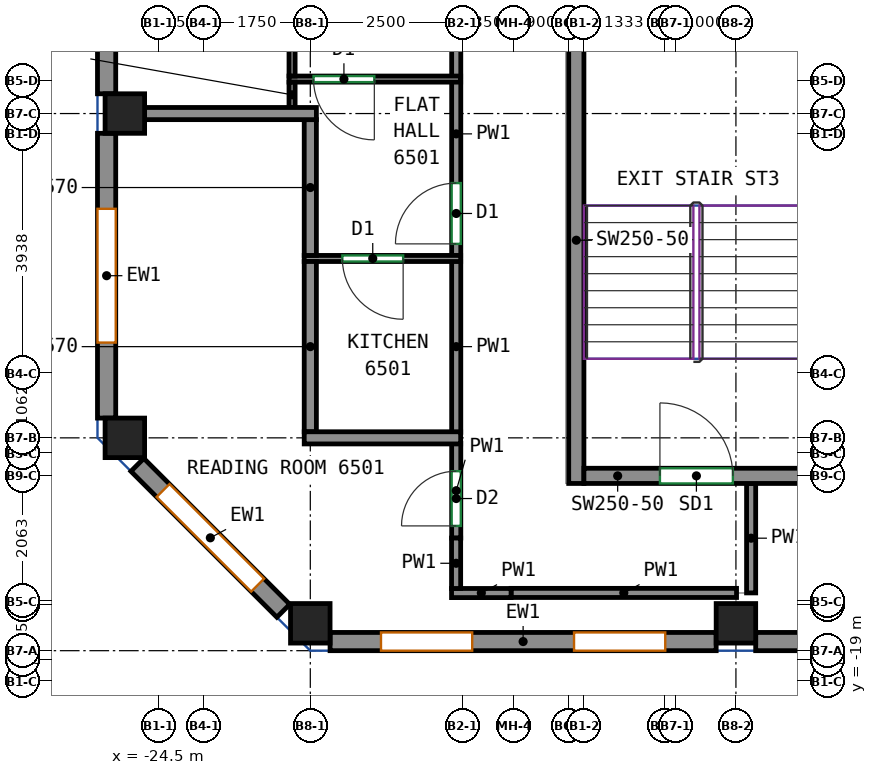
"""IFC4 building model, lengths in metres.
Left out: names, types, materials, properties, quantities, classifications, styles, units other than length and angle.
Written with IfcOpenShell. Run it as: python <this file> out.ifc"""

import sys

from ifc_helpers import new_model, si_unit, direction, frame, frame_2d, origin, origin_2d, place, context, subcontext, project, spatial, rectangle, extrude, source, transform, mapped, element, fill, save


model = new_model("IFC4")
c1 = context("Model", 3, precision=1e-05, world=origin(), true_north=direction((0.0, 1.0)))
c2 = subcontext(c1, "Body", "Model", "MODEL_VIEW")
j1 = project(units=[si_unit("LENGTHUNIT", "METRE"), si_unit("PLANEANGLEUNIT", "RADIAN")], contexts=[c1])
p1 = place(None, origin())
s1 = spatial("IfcSite", under=j1, at=p1, CompositionType="ELEMENT")
p2 = place(p1, origin())
s2 = spatial("IfcBuilding", under=s1, at=p2, CompositionType="ELEMENT")
p3 = place(p2, frame((0.0, 0.0, 267.0)))
s3 = spatial("IfcBuildingStorey", under=s2, at=p3, CompositionType="ELEMENT", Elevation=267.0)
m1 = source(origin(), c2, "Body", "SweptSolid", [
    extrude(rectangle(XDim=0.65, YDim=0.65, at=origin_2d()), origin(), (0.0, 0.0, 1.0), 3.12),
])
for number, where, z_axis, x_axis in (
    (1, (-25.05, -15.0, 0.0), (0.0, 0.0, 1.0), (1.0, 0.0, 0.0)),
    (2, (-25.05, -9.667, 0.0), (0.0, 0.0, 1.0), (1.0, 0.0, 0.0)),
    (3, (-22.0, -18.05, 0.0), (0.0, 0.0, 1.0), (1.0, 0.0, 0.0)),
    (4, (-15.0, -18.05, 0.0), (0.0, 0.0, 1.0), (1.0, 0.0, 0.0)),
):
    element("IfcColumn", number, at=place(p3, frame(where, z_axis=z_axis, x_axis=x_axis)), inside=s3, PredefinedType="COLUMN", context=c2, shape_type="MappedRepresentation", body=[
        mapped(m1, transform((0.0, 0.0, 0.0))),
    ])
m2 = source(origin(), c2, "Body", "SweptSolid", [
    extrude(rectangle(XDim=8.0, YDim=0.25, at=frame_2d((4.0, 0.0))), origin(), (0.0, 0.0, 1.0), 3.12),
])
p4 = place(p3, frame((-17.625, -15.75, 0.0), z_axis=(0.0, 0.0, 1.0), x_axis=(0.0, 1.0, 0.0)))
e5 = element("IfcWall", 5, at=p4, inside=s3, PredefinedType="SHEAR", context=c2, shape_type="MappedRepresentation", body=[
    mapped(m2, transform((0.0, 0.0, 0.0))),
])
m3 = source(origin(), c2, "Body", "SweptSolid", [
    extrude(rectangle(XDim=3.7, YDim=0.25, at=frame_2d((1.85, 0.0))), origin(), (0.0, 0.0, 1.0), 3.12),
])
p5 = place(p3, frame((-17.5, -15.625, 0.0), z_axis=(0.0, 0.0, 1.0), x_axis=(1.0, 0.0, 0.0)))
e6 = element("IfcWall", 6, at=p5, inside=s3, PredefinedType="SHEAR", context=c2, shape_type="MappedRepresentation", body=[
    mapped(m3, transform((0.0, 0.0, 0.0))),
])
p6 = place(p5, frame((1.25, 0.0, 0.0)))
e7 = element("IfcOpeningElement", 7, at=p6, cuts=e6, PredefinedType="OPENING", context=c2, shape_type="SweptSolid", body=[
    extrude(rectangle(XDim=1.2, YDim=2.1, at=frame_2d((0.6, 1.05))), frame((0.0, 0.135, 0.0), z_axis=(0.0, -1.0, 0.0), x_axis=(1.0, 0.0, 0.0)), (0.0, 0.0, 1.0), 0.27),
])
m4 = source(origin(), c2, "Body", "SweptSolid", [
    extrude(rectangle(XDim=6.35, YDim=0.3, at=frame_2d((3.175, 0.0))), origin(), (0.0, 0.0, 1.0), 3.12),
])
p7 = place(p3, frame((-21.675, -18.35, 0.0), z_axis=(0.0, 0.0, 1.0), x_axis=(1.0, 0.0, 0.0)))
e8 = element("IfcWall", 8, at=p7, inside=s3, PredefinedType="SOLIDWALL", context=c2, shape_type="MappedRepresentation", body=[
    mapped(m4, transform((0.0, 0.0, 0.0))),
])
p8 = place(p7, frame((0.837, 0.0, 0.8)))
e9 = element("IfcOpeningElement", 9, at=p8, cuts=e8, PredefinedType="OPENING", context=c2, shape_type="SweptSolid", body=[
    extrude(rectangle(XDim=1.5, YDim=2.05, at=frame_2d((0.75, 1.025))), frame((0.0, 0.16, 0.0), z_axis=(0.0, -1.0, 0.0), x_axis=(1.0, 0.0, 0.0)), (0.0, 0.0, 1.0), 0.32),
])
p9 = place(p7, frame((4.012, 0.0, 0.8)))
e10 = element("IfcOpeningElement", 10, at=p9, cuts=e8, PredefinedType="OPENING", context=c2, shape_type="SweptSolid", body=[
    extrude(rectangle(XDim=1.5, YDim=2.05, at=frame_2d((0.75, 1.025))), frame((0.0, 0.16, 0.0), z_axis=(0.0, -1.0, 0.0), x_axis=(1.0, 0.0, 0.0)), (0.0, 0.0, 1.0), 0.32),
])
p10 = place(p3, frame((-14.675, -18.35, 0.0), z_axis=(0.0, 0.0, 1.0), x_axis=(1.0, 0.0, 0.0)))
e11 = element("IfcWall", 11, at=p10, inside=s3, PredefinedType="SOLIDWALL", context=c2, shape_type="MappedRepresentation", body=[
    mapped(m4, transform((0.0, 0.0, 0.0))),
])
p11 = place(p10, frame((0.837, 0.0, 0.8)))
e12 = element("IfcOpeningElement", 12, at=p11, cuts=e11, PredefinedType="OPENING", context=c2, shape_type="SweptSolid", body=[
    extrude(rectangle(XDim=1.5, YDim=2.05, at=frame_2d((0.75, 1.025))), frame((0.0, 0.16, 0.0), z_axis=(0.0, -1.0, 0.0), x_axis=(1.0, 0.0, 0.0)), (0.0, 0.0, 1.0), 0.32),
])
p12 = place(p10, frame((4.012, 0.0, 0.8)))
e13 = element("IfcOpeningElement", 13, at=p12, cuts=e11, PredefinedType="OPENING", context=c2, shape_type="SweptSolid", body=[
    extrude(rectangle(XDim=1.5, YDim=2.05, at=frame_2d((0.75, 1.025))), frame((0.0, 0.16, 0.0), z_axis=(0.0, -1.0, 0.0), x_axis=(1.0, 0.0, 0.0)), (0.0, 0.0, 1.0), 0.32),
])
m5 = source(origin(), c2, "Body", "SweptSolid", [
    extrude(rectangle(XDim=8.184, YDim=0.3, at=frame_2d((4.092, 0.0))), origin(), (0.0, 0.0, 1.0), 3.12),
])
p13 = place(p3, frame((-25.35, -1.158, 0.0), z_axis=(0.0, 0.0, 1.0), x_axis=(0.0, -1.0, 0.0)))
e14 = element("IfcWall", 14, at=p13, inside=s3, PredefinedType="SOLIDWALL", context=c2, shape_type="MappedRepresentation", body=[
    mapped(m5, transform((0.0, 0.0, 0.0))),
])
p14 = place(p13, frame((0.946, 0.0, 0.8)))
e15 = element("IfcOpeningElement", 15, at=p14, cuts=e14, PredefinedType="OPENING", context=c2, shape_type="SweptSolid", body=[
    extrude(rectangle(XDim=2.2, YDim=2.05, at=frame_2d((1.1, 1.025))), frame((0.0, 0.16, 0.0), z_axis=(0.0, -1.0, 0.0), x_axis=(1.0, 0.0, 0.0)), (0.0, 0.0, 1.0), 0.32),
])
p15 = place(p13, frame((5.038, 0.0, 0.8)))
e16 = element("IfcOpeningElement", 16, at=p15, cuts=e14, PredefinedType="OPENING", context=c2, shape_type="SweptSolid", body=[
    extrude(rectangle(XDim=2.2, YDim=2.05, at=frame_2d((1.1, 1.025))), frame((0.0, 0.16, 0.0), z_axis=(0.0, -1.0, 0.0), x_axis=(1.0, 0.0, 0.0)), (0.0, 0.0, 1.0), 0.32),
])
m6 = source(origin(), c2, "Body", "SweptSolid", [
    extrude(rectangle(XDim=4.683, YDim=0.3, at=frame_2d((2.342, 0.0))), origin(), (0.0, 0.0, 1.0), 3.12),
])
p16 = place(p3, frame((-25.35, -9.992, 0.0), z_axis=(0.0, 0.0, 1.0), x_axis=(0.0, -1.0, 0.0)))
e17 = element("IfcWall", 17, at=p16, inside=s3, PredefinedType="SOLIDWALL", context=c2, shape_type="MappedRepresentation", body=[
    mapped(m6, transform((0.0, 0.0, 0.0))),
])
p17 = place(p16, frame((1.242, 0.0, 0.8)))
e18 = element("IfcOpeningElement", 18, at=p17, cuts=e17, PredefinedType="OPENING", context=c2, shape_type="SweptSolid", body=[
    extrude(rectangle(XDim=2.2, YDim=2.05, at=frame_2d((1.1, 1.025))), frame((0.0, 0.16, 0.0), z_axis=(0.0, -1.0, 0.0), x_axis=(1.0, 0.0, 0.0)), (0.0, 0.0, 1.0), 0.32),
])
m7 = source(origin(), c2, "Body", "SweptSolid", [
    extrude(rectangle(XDim=3.394, YDim=0.3, at=frame_2d((1.697, 0.0))), origin(), (0.0, 0.0, 1.0), 3.12),
])
p18 = place(p3, frame((-24.844, -15.444, 0.0), z_axis=(0.0, 0.0, 1.0), x_axis=(0.707070815327, -0.707142745217, 0.0)))
e19 = element("IfcWall", 19, at=p18, inside=s3, PredefinedType="SOLIDWALL", context=c2, shape_type="MappedRepresentation", body=[
    mapped(m7, transform((0.0, 0.0, 0.0))),
])
p19 = place(p18, frame((0.597, 0.0, 0.8)))
e20 = element("IfcOpeningElement", 20, at=p19, cuts=e19, PredefinedType="OPENING", context=c2, shape_type="SweptSolid", body=[
    extrude(rectangle(XDim=2.2, YDim=2.05, at=frame_2d((1.1, 1.025))), frame((0.0, 0.16, 0.0), z_axis=(0.0, -1.0, 0.0), x_axis=(1.0, 0.0, 0.0)), (0.0, 0.0, 1.0), 0.32),
])
p20 = place(p3, frame((-19.6, -14.91, 0.0), z_axis=(0.0, 0.0, 1.0), x_axis=(0.0, 1.0, 0.0)))
e21 = element("IfcWall", 21, at=p20, inside=s3, PredefinedType="PARTITIONING", context=c2, shape_type="SweptSolid", body=[
    extrude(rectangle(XDim=2.82, YDim=0.15, at=frame_2d((1.41, 0.0))), origin(), (0.0, 0.0, 1.0), 3.12),
])
p21 = place(p3, frame((-19.6, -12.01, 0.0), z_axis=(0.0, 0.0, 1.0), x_axis=(0.0, 1.0, 0.0)))
e22 = element("IfcWall", 22, at=p21, inside=s3, PredefinedType="PARTITIONING", context=c2, shape_type="SweptSolid", body=[
    extrude(rectangle(XDim=2.87, YDim=0.15, at=frame_2d((1.435, 0.0))), origin(), (0.0, 0.0, 1.0), 3.12),
])
p22 = place(p21, frame((0.2, 0.0, 0.0)))
e23 = element("IfcOpeningElement", 23, at=p22, cuts=e22, PredefinedType="OPENING", context=c2, shape_type="SweptSolid", body=[
    extrude(rectangle(XDim=1.0, YDim=2.1, at=frame_2d((0.5, 1.05))), frame((0.0, 0.085, 0.0), z_axis=(0.0, -1.0, 0.0), x_axis=(1.0, 0.0, 0.0)), (0.0, 0.0, 1.0), 0.17),
])
p23 = place(p3, frame((-19.6, -9.06, 0.0), z_axis=(0.0, 0.0, 1.0), x_axis=(0.0, 1.0, 0.0)))
e24 = element("IfcWall", 24, at=p23, inside=s3, PredefinedType="PARTITIONING", context=c2, shape_type="SweptSolid", body=[
    extrude(rectangle(XDim=1.608, YDim=0.15, at=frame_2d((0.804, 0.0))), origin(), (0.0, 0.0, 1.0), 3.12),
])
p24 = place(p3, frame((-14.75, -17.55, 0.0), z_axis=(0.0, 0.0, 1.0), x_axis=(0.0, 1.0, 0.0)))
e25 = element("IfcWall", 25, at=p24, inside=s3, PredefinedType="PARTITIONING", context=c2, shape_type="SweptSolid", body=[
    extrude(rectangle(XDim=1.8, YDim=0.15, at=frame_2d((0.9, 0.0))), origin(), (0.0, 0.0, 1.0), 3.12),
])
p25 = place(p3, frame((-19.6, -16.648, 0.0), z_axis=(0.0, 0.0, 1.0), x_axis=(0.0, 1.0, 0.0)))
e26 = element("IfcWall", 26, at=p25, inside=s3, PredefinedType="PARTITIONING", context=c2, shape_type="SweptSolid", body=[
    extrude(rectangle(XDim=1.558, YDim=0.15, at=frame_2d((0.779, 0.0))), origin(), (0.0, 0.0, 1.0), 3.12),
])
p26 = place(p25, frame((0.2, 0.0, 0.0)))
e27 = element("IfcOpeningElement", 27, at=p26, cuts=e26, PredefinedType="OPENING", context=c2, shape_type="SweptSolid", body=[
    extrude(rectangle(XDim=0.9, YDim=2.1, at=frame_2d((0.45, 1.05))), frame((0.0, 0.085, 0.0), z_axis=(0.0, -1.0, 0.0), x_axis=(1.0, 0.0, 0.0)), (0.0, 0.0, 1.0), 0.17),
])
p27 = place(p3, frame((-18.698, -17.55, 0.0), z_axis=(0.0, 0.0, 1.0), x_axis=(1.0, 0.0, 0.0)))
e28 = element("IfcWall", 28, at=p27, inside=s3, PredefinedType="PARTITIONING", context=c2, shape_type="SweptSolid", body=[
    extrude(rectangle(XDim=3.708, YDim=0.15, at=frame_2d((1.854, 0.0))), origin(), (0.0, 0.0, 1.0), 3.12),
])
p28 = place(p3, frame((-19.677, -17.552, 0.0), z_axis=(0.0, 0.0, 1.0), x_axis=(1.0, 0.0, 0.0)))
e29 = element("IfcWall", 29, at=p28, inside=s3, PredefinedType="PARTITIONING", context=c2, shape_type="SweptSolid", body=[
    extrude(rectangle(XDim=0.979, YDim=0.15, at=frame_2d((0.49, 0.0))), origin(), (0.0, 0.0, 1.0), 3.12),
])
p29 = place(p3, frame((-19.602, -17.477, 0.0), z_axis=(0.0, 0.0, 1.0), x_axis=(0.0, 1.0, 0.0)))
e30 = element("IfcWall", 30, at=p29, inside=s3, PredefinedType="PARTITIONING", context=c2, shape_type="SweptSolid", body=[
    extrude(rectangle(XDim=0.829, YDim=0.15, at=frame_2d((0.415, 0.0))), origin(), (0.0, 0.0, 1.0), 3.12),
])
p30 = place(p3, frame((-19.527, -12.05, 0.0), z_axis=(0.0, 0.0, 1.0), x_axis=(-1.0, 0.0, 0.0)))
e31 = element("IfcWall", 31, at=p30, inside=s3, PredefinedType="PARTITIONING", context=c2, shape_type="SweptSolid", body=[
    extrude(rectangle(XDim=2.573, YDim=0.1, at=frame_2d((1.287, 0.0))), origin(), (0.0, 0.0, 1.0), 3.12),
])
p31 = place(p30, frame((0.946, 0.0, 0.0)))
e32 = element("IfcOpeningElement", 32, at=p31, cuts=e31, PredefinedType="OPENING", context=c2, shape_type="SweptSolid", body=[
    extrude(rectangle(XDim=1.0, YDim=2.1, at=frame_2d((0.5, 1.05))), frame((0.0, 0.06, 0.0), z_axis=(0.0, -1.0, 0.0), x_axis=(1.0, 0.0, 0.0)), (0.0, 0.0, 1.0), 0.12),
])
p32 = place(p3, frame((-22.0, -14.9, 0.0), z_axis=(0.0, 0.0, 1.0), x_axis=(0.0, 1.0, 0.0)))
e33 = element("IfcWall", 33, at=p32, inside=s3, PredefinedType="PARTITIONING", context=c2, shape_type="SweptSolid", body=[
    extrude(rectangle(XDim=2.8, YDim=0.2, at=frame_2d((1.4, 0.0))), origin(), (0.0, 0.0, 1.0), 2.57),
])
p33 = place(p3, frame((-22.1, -15.0, 0.0), z_axis=(0.0, 0.0, 1.0), x_axis=(1.0, 0.0, 0.0)))
e34 = element("IfcWall", 34, at=p33, inside=s3, PredefinedType="PARTITIONING", context=c2, shape_type="SweptSolid", body=[
    extrude(rectangle(XDim=2.573, YDim=0.2, at=frame_2d((1.287, 0.0))), origin(), (0.0, 0.0, 1.0), 3.12),
])
p34 = place(p3, frame((-19.527, -9.1, 0.0), z_axis=(0.0, 0.0, 1.0), x_axis=(-1.0, 0.0, 0.0)))
e35 = element("IfcWall", 35, at=p34, inside=s3, PredefinedType="PARTITIONING", context=c2, shape_type="SweptSolid", body=[
    extrude(rectangle(XDim=2.823, YDim=0.1, at=frame_2d((1.412, 0.0))), origin(), (0.0, 0.0, 1.0), 3.12),
])
p35 = place(p34, frame((1.42, 0.0, 0.0)))
e36 = element("IfcOpeningElement", 36, at=p35, cuts=e35, PredefinedType="OPENING", context=c2, shape_type="SweptSolid", body=[
    extrude(rectangle(XDim=1.0, YDim=2.1, at=frame_2d((0.5, 1.05))), frame((0.0, 0.06, 0.0), z_axis=(0.0, -1.0, 0.0), x_axis=(1.0, 0.0, 0.0)), (0.0, 0.0, 1.0), 0.12),
])
p36 = place(p3, frame((-22.3, -9.567, 0.0), z_axis=(0.0, 0.0, 1.0), x_axis=(0.0, 1.0, 0.0)))
e37 = element("IfcWall", 37, at=p36, inside=s3, PredefinedType="PARTITIONING", context=c2, shape_type="SweptSolid", body=[
    extrude(rectangle(XDim=0.417, YDim=0.1, at=frame_2d((0.208, 0.0))), origin(), (0.0, 0.0, 1.0), 2.57),
])
p37 = place(p3, frame((-22.0, -12.0, 0.0), z_axis=(0.0, 0.0, 1.0), x_axis=(0.0, 1.0, 0.0)))
e38 = element("IfcWall", 38, at=p37, inside=s3, PredefinedType="PARTITIONING", context=c2, shape_type="SweptSolid", body=[
    extrude(rectangle(XDim=2.233, YDim=0.2, at=frame_2d((1.116, 0.0))), origin(), (0.0, 0.0, 1.0), 2.57),
])
p38 = place(p3, frame((-22.3, -9.05, 0.0), z_axis=(0.0, 0.0, 1.0), x_axis=(0.0, 1.0, 0.0)))
e39 = element("IfcWall", 39, at=p38, inside=s3, PredefinedType="PARTITIONING", context=c2, shape_type="SweptSolid", body=[
    extrude(rectangle(XDim=2.85, YDim=0.1, at=frame_2d((1.425, 0.0))), origin(), (0.0, 0.0, 1.0), 2.57),
])
p39 = place(p3, frame((-24.725, -9.667, 0.0), z_axis=(0.0, 0.0, 1.0), x_axis=(1.0, 0.0, 0.0)))
e40 = element("IfcWall", 40, at=p39, inside=s3, PredefinedType="PARTITIONING", context=c2, shape_type="SweptSolid", body=[
    extrude(rectangle(XDim=2.825, YDim=0.2, at=frame_2d((1.413, 0.0))), origin(), (0.0, 0.0, 1.0), 3.12),
])
p40 = place(p8, origin())
e41 = element("IfcWindow", 41, at=p40, inside=s3, PartitioningType="SINGLE_PANEL", PredefinedType="WINDOW", context=c2, shape_type="SweptSolid", body=[
    extrude(rectangle(XDim=1.5, YDim=2.05, at=frame_2d((0.75, 1.025))), frame((0.0, 0.03, 0.0), z_axis=(0.0, -1.0, 0.0), x_axis=(1.0, 0.0, 0.0)), (0.0, 0.0, 1.0), 0.06),
])
fill(e9, e41)
p41 = place(p9, origin())
e42 = element("IfcWindow", 42, at=p41, inside=s3, PartitioningType="SINGLE_PANEL", PredefinedType="WINDOW", context=c2, shape_type="SweptSolid", body=[
    extrude(rectangle(XDim=1.5, YDim=2.05, at=frame_2d((0.75, 1.025))), frame((0.0, 0.03, 0.0), z_axis=(0.0, -1.0, 0.0), x_axis=(1.0, 0.0, 0.0)), (0.0, 0.0, 1.0), 0.06),
])
fill(e10, e42)
p42 = place(p17, origin())
e43 = element("IfcWindow", 43, at=p42, inside=s3, PartitioningType="SINGLE_PANEL", PredefinedType="WINDOW", context=c2, shape_type="SweptSolid", body=[
    extrude(rectangle(XDim=2.2, YDim=2.05, at=frame_2d((1.1, 1.025))), frame((0.0, 0.03, 0.0), z_axis=(0.0, -1.0, 0.0), x_axis=(1.0, 0.0, 0.0)), (0.0, 0.0, 1.0), 0.06),
])
fill(e18, e43)
p43 = place(p19, origin())
e44 = element("IfcWindow", 44, at=p43, inside=s3, PartitioningType="SINGLE_PANEL", PredefinedType="WINDOW", context=c2, shape_type="SweptSolid", body=[
    extrude(rectangle(XDim=2.2, YDim=2.05, at=frame_2d((1.1, 1.025))), frame((0.0, 0.03, 0.0), z_axis=(0.0, -1.0, 0.0), x_axis=(1.0, 0.0, 0.0)), (0.0, 0.0, 1.0), 0.06),
])
fill(e20, e44)
p44 = place(p6, origin())
e45 = element("IfcDoor", 45, at=p44, inside=s3, OperationType="DOUBLE_DOOR_SINGLE_SWING", PredefinedType="DOOR", context=c2, shape_type="SweptSolid", body=[
    extrude(rectangle(XDim=1.2, YDim=2.1, at=frame_2d((0.6, 1.05))), frame((0.0, 0.025, 0.0), z_axis=(0.0, -1.0, 0.0), x_axis=(1.0, 0.0, 0.0)), (0.0, 0.0, 1.0), 0.05),
])
fill(e7, e45)
p45 = place(p26, origin())
e46 = element("IfcDoor", 46, at=p45, inside=s3, OperationType="SINGLE_SWING_LEFT", PredefinedType="DOOR", context=c2, shape_type="SweptSolid", body=[
    extrude(rectangle(XDim=0.9, YDim=2.1, at=frame_2d((0.45, 1.05))), frame((0.0, 0.025, 0.0), z_axis=(0.0, -1.0, 0.0), x_axis=(1.0, 0.0, 0.0)), (0.0, 0.0, 1.0), 0.05),
])
fill(e27, e46)
p46 = place(p31, origin())
e47 = element("IfcDoor", 47, at=p46, inside=s3, OperationType="SINGLE_SWING_LEFT", PredefinedType="DOOR", context=c2, shape_type="SweptSolid", body=[
    extrude(rectangle(XDim=1.0, YDim=2.1, at=frame_2d((0.5, 1.05))), frame((0.0, 0.025, 0.0), z_axis=(0.0, -1.0, 0.0), x_axis=(1.0, 0.0, 0.0)), (0.0, 0.0, 1.0), 0.05),
])
fill(e32, e47)
p47 = place(p22, origin())
e48 = element("IfcDoor", 48, at=p47, inside=s3, OperationType="SINGLE_SWING_LEFT", PredefinedType="DOOR", context=c2, shape_type="SweptSolid", body=[
    extrude(rectangle(XDim=1.0, YDim=2.1, at=frame_2d((0.5, 1.05))), frame((0.0, 0.025, 0.0), z_axis=(0.0, -1.0, 0.0), x_axis=(1.0, 0.0, 0.0)), (0.0, 0.0, 1.0), 0.05),
])
fill(e23, e48)
p48 = place(p35, origin())
e49 = element("IfcDoor", 49, at=p48, inside=s3, OperationType="SINGLE_SWING_LEFT", PredefinedType="DOOR", context=c2, shape_type="SweptSolid", body=[
    extrude(rectangle(XDim=1.0, YDim=2.1, at=frame_2d((0.5, 1.05))), frame((0.0, 0.025, 0.0), z_axis=(0.0, -1.0, 0.0), x_axis=(1.0, 0.0, 0.0)), (0.0, 0.0, 1.0), 0.05),
])
fill(e36, e49)
save(model, sys.argv[1])
